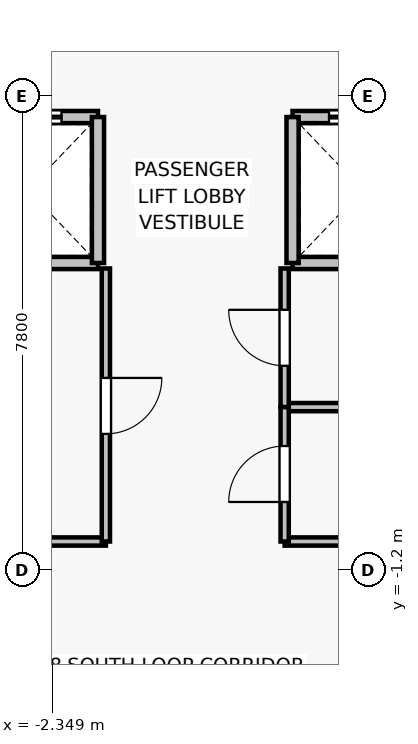
"""IFC4 building model, lengths in metres.
Left out: names, types, materials, properties, quantities, classifications, styles, units other than length and angle.
Written with IfcOpenShell. Run it as: python <this file> out.ifc"""

import sys

from ifc_helpers import new_model, si_unit, direction, frame, frame_2d, origin, place, context, subcontext, project, spatial, rectangle, extrude, source, transform, mapped, element, fill, save


model = new_model("IFC4")
c1 = context("Model", 3, precision=1e-05, world=origin(), true_north=direction((0.0, 1.0)))
c2 = subcontext(c1, "Body", "Model", "MODEL_VIEW")
j1 = project(units=[si_unit("LENGTHUNIT", "METRE"), si_unit("PLANEANGLEUNIT", "RADIAN")], contexts=[c1])
p1 = place(None, origin())
s1 = spatial("IfcSite", under=j1, at=p1, CompositionType="ELEMENT")
p2 = place(p1, origin())
s2 = spatial("IfcBuilding", under=s1, at=p2, CompositionType="ELEMENT")
p3 = place(p2, frame((0.0, 0.0, 103.3)))
s3 = spatial("IfcBuildingStorey", under=s2, at=p3, CompositionType="ELEMENT", Elevation=103.3)
p4 = place(p3, frame((-1.6, 3.85, 0.0), z_axis=(0.0, 0.0, 1.0), x_axis=(-1.0, 0.0, 0.0)))
e1 = element("IfcWall", 1, at=p4, inside=s3, PredefinedType="SOLIDWALL", context=c2, shape_type="SweptSolid", body=[
    extrude(rectangle(XDim=2.3, YDim=0.2, at=frame_2d((1.15, 0.0))), origin(), (0.0, 0.0, 1.0), 3.075),
])
p5 = place(p3, frame((-3.9, 6.25, 0.0), z_axis=(0.0, 0.0, 1.0), x_axis=(1.0, 0.0, 0.0)))
e2 = element("IfcWall", 2, at=p5, inside=s3, PredefinedType="SOLIDWALL", context=c2, shape_type="SweptSolid", body=[
    extrude(rectangle(XDim=2.3, YDim=0.2, at=frame_2d((1.15, 0.0))), origin(), (0.0, 0.0, 1.0), 3.075),
])
p6 = place(p5, frame((0.6, 0.0, 0.0)))
e3 = element("IfcOpeningElement", 3, at=p6, cuts=e2, PredefinedType="OPENING", context=c2, shape_type="SweptSolid", body=[
    extrude(rectangle(XDim=1.1, YDim=2.2, at=frame_2d((0.55, 1.1))), frame((0.0, 0.11, 0.0), z_axis=(0.0, -1.0, 0.0), x_axis=(1.0, 0.0, 0.0)), (0.0, 0.0, 1.0), 0.22),
])
p7 = place(p3, frame((-1.6, 6.25, 0.0), z_axis=(0.0, 0.0, 1.0), x_axis=(0.0, -1.0, 0.0)))
e4 = element("IfcWall", 4, at=p7, inside=s3, PredefinedType="SOLIDWALL", context=c2, shape_type="SweptSolid", body=[
    extrude(rectangle(XDim=2.4, YDim=0.2, at=frame_2d((1.2, 0.0))), origin(), (0.0, 0.0, 1.0), 3.075),
])
p8 = place(p3, frame((3.9, 3.85, 0.0), z_axis=(0.0, 0.0, 1.0), x_axis=(-1.0, 0.0, 0.0)))
e5 = element("IfcWall", 5, at=p8, inside=s3, PredefinedType="SOLIDWALL", context=c2, shape_type="SweptSolid", body=[
    extrude(rectangle(XDim=2.3, YDim=0.2, at=frame_2d((1.15, 0.0))), origin(), (0.0, 0.0, 1.0), 3.075),
])
p9 = place(p3, frame((1.6, 6.25, 0.0), z_axis=(0.0, 0.0, 1.0), x_axis=(1.0, 0.0, 0.0)))
e6 = element("IfcWall", 6, at=p9, inside=s3, PredefinedType="SOLIDWALL", context=c2, shape_type="SweptSolid", body=[
    extrude(rectangle(XDim=2.3, YDim=0.2, at=frame_2d((1.15, 0.0))), origin(), (0.0, 0.0, 1.0), 3.075),
])
p10 = place(p9, frame((0.6, 0.0, 0.0)))
e7 = element("IfcOpeningElement", 7, at=p10, cuts=e6, PredefinedType="OPENING", context=c2, shape_type="SweptSolid", body=[
    extrude(rectangle(XDim=1.1, YDim=2.2, at=frame_2d((0.55, 1.1))), frame((0.0, 0.11, 0.0), z_axis=(0.0, -1.0, 0.0), x_axis=(1.0, 0.0, 0.0)), (0.0, 0.0, 1.0), 0.22),
])
p11 = place(p3, frame((1.6, 3.85, 0.0), z_axis=(0.0, 0.0, 1.0), x_axis=(0.0, 1.0, 0.0)))
e8 = element("IfcWall", 8, at=p11, inside=s3, PredefinedType="SOLIDWALL", context=c2, shape_type="SweptSolid", body=[
    extrude(rectangle(XDim=2.4, YDim=0.2, at=frame_2d((1.2, 0.0))), origin(), (0.0, 0.0, 1.0), 3.075),
])
p12 = place(p3, frame((-1.47, -0.73, 0.0), z_axis=(0.0, 0.0, 1.0), x_axis=(-1.0, 0.0, 0.0)))
e9 = element("IfcWall", 9, at=p12, inside=s3, PredefinedType="PARTITIONING", context=c2, shape_type="SweptSolid", body=[
    extrude(rectangle(XDim=5.11, YDim=0.135, at=frame_2d((2.555, 0.0))), origin(), (0.0, 0.0, 1.0), 3.075),
])
p13 = place(p3, frame((-1.47, 3.76, 0.0), z_axis=(0.0, 0.0, 1.0), x_axis=(0.0, -1.0, 0.0)))
e10 = element("IfcWall", 10, at=p13, inside=s3, PredefinedType="PARTITIONING", context=c2, shape_type="SweptSolid", body=[
    extrude(rectangle(XDim=4.49, YDim=0.135, at=frame_2d((2.245, 0.0))), origin(), (0.0, 0.0, 1.0), 3.075),
])
p14 = place(p13, frame((1.8, 0.0, 0.0)))
e11 = element("IfcOpeningElement", 11, at=p14, cuts=e10, PredefinedType="OPENING", context=c2, shape_type="SweptSolid", body=[
    extrude(rectangle(XDim=0.92, YDim=2.1, at=frame_2d((0.46, 1.05))), frame((0.0, 0.077, 0.0), z_axis=(0.0, -1.0, 0.0), x_axis=(1.0, 0.0, 0.0)), (0.0, 0.0, 1.0), 0.155),
])
p15 = place(p3, frame((6.58, 1.48, 0.0), z_axis=(0.0, 0.0, 1.0), x_axis=(-1.0, 0.0, 0.0)))
e12 = element("IfcWall", 12, at=p15, inside=s3, PredefinedType="PARTITIONING", context=c2, shape_type="SweptSolid", body=[
    extrude(rectangle(XDim=5.11, YDim=0.135, at=frame_2d((2.555, 0.0))), origin(), (0.0, 0.0, 1.0), 3.075),
])
p16 = place(p3, frame((1.47, 1.48, 0.0), z_axis=(0.0, 0.0, 1.0), x_axis=(0.0, 1.0, 0.0)))
e13 = element("IfcWall", 13, at=p16, inside=s3, PredefinedType="PARTITIONING", context=c2, shape_type="SweptSolid", body=[
    extrude(rectangle(XDim=2.28, YDim=0.135, at=frame_2d((1.14, 0.0))), origin(), (0.0, 0.0, 1.0), 3.075),
])
p17 = place(p16, frame((0.68, 0.0, 0.0)))
e14 = element("IfcOpeningElement", 14, at=p17, cuts=e13, PredefinedType="OPENING", context=c2, shape_type="SweptSolid", body=[
    extrude(rectangle(XDim=0.92, YDim=2.1, at=frame_2d((0.46, 1.05))), frame((0.0, 0.077, 0.0), z_axis=(0.0, -1.0, 0.0), x_axis=(1.0, 0.0, 0.0)), (0.0, 0.0, 1.0), 0.155),
])
p18 = place(p3, frame((4.18, -0.73, 0.0), z_axis=(0.0, 0.0, 1.0), x_axis=(-1.0, 0.0, 0.0)))
e15 = element("IfcWall", 15, at=p18, inside=s3, PredefinedType="PARTITIONING", context=c2, shape_type="SweptSolid", body=[
    extrude(rectangle(XDim=2.71, YDim=0.135, at=frame_2d((1.355, 0.0))), origin(), (0.0, 0.0, 1.0), 3.075),
])
p19 = place(p3, frame((1.47, -0.73, 0.0), z_axis=(0.0, 0.0, 1.0), x_axis=(0.0, 1.0, 0.0)))
e16 = element("IfcWall", 16, at=p19, inside=s3, PredefinedType="PARTITIONING", context=c2, shape_type="SweptSolid", body=[
    extrude(rectangle(XDim=2.21, YDim=0.135, at=frame_2d((1.105, 0.0))), origin(), (0.0, 0.0, 1.0), 3.075),
])
p20 = place(p19, frame((0.65, 0.0, 0.0)))
e17 = element("IfcOpeningElement", 17, at=p20, cuts=e16, PredefinedType="OPENING", context=c2, shape_type="SweptSolid", body=[
    extrude(rectangle(XDim=0.92, YDim=2.1, at=frame_2d((0.46, 1.05))), frame((0.0, 0.077, 0.0), z_axis=(0.0, -1.0, 0.0), x_axis=(1.0, 0.0, 0.0)), (0.0, 0.0, 1.0), 0.155),
])
m1 = source(origin(), c2, "Body", "SweptSolid", [
    extrude(rectangle(XDim=1.1, YDim=2.2, at=frame_2d((0.55, 1.1))), frame((0.0, 0.025, 0.0), z_axis=(0.0, -1.0, 0.0), x_axis=(1.0, 0.0, 0.0)), (0.0, 0.0, 1.0), 0.05),
])
p21 = place(p6, origin())
e18 = element("IfcDoor", 18, at=p21, inside=s3, OperationType="DOUBLE_DOOR_SLIDING", PredefinedType="DOOR", context=c2, shape_type="MappedRepresentation", body=[
    mapped(m1, transform((0.0, 0.0, 0.0), x_axis=(1.0, 0.0, 0.0), y_axis=(0.0, 1.0, 0.0), z_axis=(0.0, 0.0, 1.0), scale=1.0)),
])
fill(e3, e18)
p22 = place(p10, origin())
e19 = element("IfcDoor", 19, at=p22, inside=s3, OperationType="DOUBLE_DOOR_SLIDING", PredefinedType="DOOR", context=c2, shape_type="MappedRepresentation", body=[
    mapped(m1, transform((0.0, 0.0, 0.0), x_axis=(1.0, 0.0, 0.0), y_axis=(0.0, 1.0, 0.0), z_axis=(0.0, 0.0, 1.0), scale=1.0)),
])
fill(e7, e19)
m2 = source(origin(), c2, "Body", "SweptSolid", [
    extrude(rectangle(XDim=0.92, YDim=2.1, at=frame_2d((0.46, 1.05))), frame((0.0, 0.025, 0.0), z_axis=(0.0, -1.0, 0.0), x_axis=(1.0, 0.0, 0.0)), (0.0, 0.0, 1.0), 0.05),
])
p23 = place(p14, origin())
e20 = element("IfcDoor", 20, at=p23, inside=s3, OperationType="SINGLE_SWING_LEFT", PredefinedType="DOOR", context=c2, shape_type="MappedRepresentation", body=[
    mapped(m2, transform((0.0, 0.0, 0.0), x_axis=(1.0, 0.0, 0.0), y_axis=(0.0, 1.0, 0.0), z_axis=(0.0, 0.0, 1.0), scale=1.0)),
])
fill(e11, e20)
p24 = place(p17, origin())
e21 = element("IfcDoor", 21, at=p24, inside=s3, OperationType="SINGLE_SWING_RIGHT", PredefinedType="DOOR", context=c2, shape_type="MappedRepresentation", body=[
    mapped(m2, transform((0.0, 0.0, 0.0), x_axis=(1.0, 0.0, 0.0), y_axis=(0.0, 1.0, 0.0), z_axis=(0.0, 0.0, 1.0), scale=1.0)),
])
fill(e14, e21)
p25 = place(p20, origin())
e22 = element("IfcDoor", 22, at=p25, inside=s3, OperationType="SINGLE_SWING_LEFT", PredefinedType="DOOR", context=c2, shape_type="MappedRepresentation", body=[
    mapped(m2, transform((0.0, 0.0, 0.0), x_axis=(1.0, 0.0, 0.0), y_axis=(0.0, 1.0, 0.0), z_axis=(0.0, 0.0, 1.0), scale=1.0)),
])
fill(e17, e22)
save(model, sys.argv[1])
